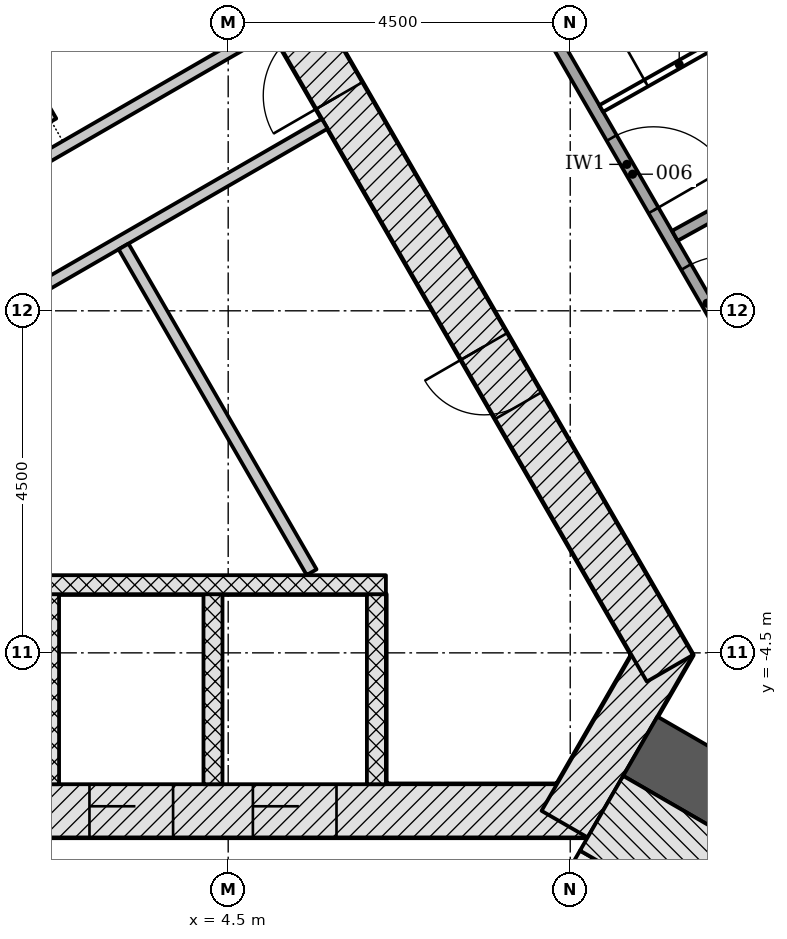
"""IFC4 building model, lengths in metres.
Left out: names, types, materials, properties, quantities, classifications, styles, units other than length and angle.
Written with IfcOpenShell. Run it as: python <this file> out.ifc"""

import sys

from ifc_helpers import new_model, si_unit, direction, frame, frame_2d, origin, place, context, subcontext, project, spatial, rectangle, extrude, element, fill, save


model = new_model("IFC4")
c1 = context("Model", 3, precision=1e-05, world=origin(), true_north=direction((0.0, 1.0)))
c2 = subcontext(c1, "Body", "Model", "MODEL_VIEW")
j1 = project(units=[si_unit("LENGTHUNIT", "METRE"), si_unit("PLANEANGLEUNIT", "RADIAN")], contexts=[c1])
p1 = place(None, origin())
s1 = spatial("IfcSite", under=j1, at=p1, CompositionType="ELEMENT")
p2 = place(p1, origin())
s2 = spatial("IfcBuilding", under=s1, at=p2, CompositionType="ELEMENT")
p3 = place(p2, frame((0.0, 0.0, 27.6)))
s3 = spatial("IfcBuildingStorey", under=s2, at=p3, CompositionType="ELEMENT", Elevation=27.6)
p4 = place(p3, frame((-9.229, -6.578, -0.2), z_axis=(0.0, 0.0, 1.0), x_axis=(1.0, 0.0, 0.0)))
e1 = element("IfcWall", 1, at=p4, inside=s3, PredefinedType="SHEAR", context=c2, shape_type="SweptSolid", body=[
    extrude(rectangle(XDim=18.458, YDim=0.7, at=frame_2d((9.229, 0.0))), origin(), (0.0, 0.0, 1.0), 3.6),
])
p5 = place(p4, frame((3.304, 0.0, 0.2)))
e2 = element("IfcOpeningElement", 2, at=p5, cuts=e1, PredefinedType="OPENING", context=c2, shape_type="SweptSolid", body=[
    extrude(rectangle(XDim=1.1, YDim=2.1, at=frame_2d((0.55, 1.05))), frame((0.0, 0.36, 0.0), z_axis=(0.0, -1.0, 0.0), x_axis=(1.0, 0.0, 0.0)), (0.0, 0.0, 1.0), 0.72),
])
p6 = place(p4, frame((5.454, 0.0, 0.2)))
e3 = element("IfcOpeningElement", 3, at=p6, cuts=e1, PredefinedType="OPENING", context=c2, shape_type="SweptSolid", body=[
    extrude(rectangle(XDim=1.1, YDim=2.1, at=frame_2d((0.55, 1.05))), frame((0.0, 0.36, 0.0), z_axis=(0.0, -1.0, 0.0), x_axis=(1.0, 0.0, 0.0)), (0.0, 0.0, 1.0), 0.72),
])
p7 = place(p4, frame((7.604, 0.0, 0.2)))
e4 = element("IfcOpeningElement", 4, at=p7, cuts=e1, PredefinedType="OPENING", context=c2, shape_type="SweptSolid", body=[
    extrude(rectangle(XDim=1.1, YDim=2.1, at=frame_2d((0.55, 1.05))), frame((0.0, 0.36, 0.0), z_axis=(0.0, -1.0, 0.0), x_axis=(1.0, 0.0, 0.0)), (0.0, 0.0, 1.0), 0.72),
])
p8 = place(p4, frame((9.754, 0.0, 0.2)))
e5 = element("IfcOpeningElement", 5, at=p8, cuts=e1, PredefinedType="OPENING", context=c2, shape_type="SweptSolid", body=[
    extrude(rectangle(XDim=1.1, YDim=2.1, at=frame_2d((0.55, 1.05))), frame((0.0, 0.36, 0.0), z_axis=(0.0, -1.0, 0.0), x_axis=(1.0, 0.0, 0.0)), (0.0, 0.0, 1.0), 0.72),
])
p9 = place(p4, frame((11.904, 0.0, 0.2)))
e6 = element("IfcOpeningElement", 6, at=p9, cuts=e1, PredefinedType="OPENING", context=c2, shape_type="SweptSolid", body=[
    extrude(rectangle(XDim=1.1, YDim=2.1, at=frame_2d((0.55, 1.05))), frame((0.0, 0.36, 0.0), z_axis=(0.0, -1.0, 0.0), x_axis=(1.0, 0.0, 0.0)), (0.0, 0.0, 1.0), 0.72),
])
p10 = place(p4, frame((14.054, 0.0, 0.2)))
e7 = element("IfcOpeningElement", 7, at=p10, cuts=e1, PredefinedType="OPENING", context=c2, shape_type="SweptSolid", body=[
    extrude(rectangle(XDim=1.1, YDim=2.1, at=frame_2d((0.55, 1.05))), frame((0.0, 0.36, 0.0), z_axis=(0.0, -1.0, 0.0), x_axis=(1.0, 0.0, 0.0)), (0.0, 0.0, 1.0), 0.72),
])
p11 = place(p4, frame((1.079, 0.0, 0.2)))
e8 = element("IfcOpeningElement", 8, at=p11, cuts=e1, PredefinedType="OPENING", context=c2, shape_type="SweptSolid", body=[
    extrude(rectangle(XDim=0.9, YDim=2.1, at=frame_2d((0.45, 1.05))), frame((0.0, 0.36, 0.0), z_axis=(0.0, -1.0, 0.0), x_axis=(1.0, 0.0, 0.0)), (0.0, 0.0, 1.0), 0.72),
])
p12 = place(p3, frame((8.926, -6.753, -0.2), z_axis=(0.0, 0.0, 1.0), x_axis=(0.500042739161, 0.866000726912, 0.0)))
e9 = element("IfcWall", 9, at=p12, inside=s3, PredefinedType="SHEAR", context=c2, shape_type="SweptSolid", body=[
    extrude(rectangle(XDim=2.771, YDim=0.7, at=frame_2d((1.386, 0.0))), origin(), (0.0, 0.0, 1.0), 3.6),
])
p13 = place(p3, frame((10.311, -4.703, -0.2), z_axis=(0.0, 0.0, 1.0), x_axis=(-0.500001446645, 0.866024568562, 0.0)))
e10 = element("IfcWall", 10, at=p13, inside=s3, PredefinedType="SHEAR", context=c2, shape_type="SweptSolid", body=[
    extrude(rectangle(XDim=18.458, YDim=0.7, at=frame_2d((9.229, 0.0))), origin(), (0.0, 0.0, 1.0), 3.6),
])
p14 = place(p13, frame((8.7, 0.0, 0.2)))
e11 = element("IfcOpeningElement", 11, at=p14, cuts=e10, PredefinedType="OPENING", context=c2, shape_type="SweptSolid", body=[
    extrude(rectangle(XDim=1.0, YDim=2.1, at=frame_2d((0.5, 1.05))), frame((0.0, 0.36, 0.0), z_axis=(0.0, -1.0, 0.0), x_axis=(1.0, 0.0, 0.0)), (0.0, 0.0, 1.0), 0.72),
])
p15 = place(p13, frame((3.99, 0.0, 0.2)))
e12 = element("IfcOpeningElement", 12, at=p15, cuts=e10, PredefinedType="OPENING", context=c2, shape_type="SweptSolid", body=[
    extrude(rectangle(XDim=0.9, YDim=2.1, at=frame_2d((0.45, 1.05))), frame((0.0, 0.36, 0.0), z_axis=(0.0, -1.0, 0.0), x_axis=(1.0, 0.0, 0.0)), (0.0, 0.0, 1.0), 0.72),
])
p16 = place(p13, frame((13.539, 0.0, 0.2)))
e13 = element("IfcOpeningElement", 13, at=p16, cuts=e10, PredefinedType="OPENING", context=c2, shape_type="SweptSolid", body=[
    extrude(rectangle(XDim=0.9, YDim=2.1, at=frame_2d((0.45, 1.05))), frame((0.0, 0.36, 0.0), z_axis=(0.0, -1.0, 0.0), x_axis=(1.0, 0.0, 0.0)), (0.0, 0.0, 1.0), 0.72),
])
p17 = place(p3, frame((9.922, -5.728, -0.2), z_axis=(0.0, 0.0, 1.0), x_axis=(0.866028046028, -0.499995423472, 0.0)))
e14 = element("IfcWall", 14, at=p17, inside=s3, PredefinedType="SHEAR", context=c2, shape_type="SweptSolid", body=[
    extrude(rectangle(XDim=14.633, YDim=0.9, at=frame_2d((7.316, 0.0))), origin(), (0.0, 0.0, 1.0), 3.6),
])
for number, where, z_axis, x_axis in (
    (15, (2.15, -6.228, -0.2), (0.0, 0.0, 1.0), (0.0, 1.0, 0.0)),
    (16, (4.3, -6.228, -0.2), (0.0, 0.0, 1.0), (0.0, 1.0, 0.0)),
    (17, (6.45, -6.228, -0.2), (0.0, 0.0, 1.0), (0.0, 1.0, 0.0)),
):
    element("IfcWall", number, at=place(p3, frame(where, z_axis=z_axis, x_axis=x_axis)), inside=s3, PredefinedType="PARTITIONING", context=c2, shape_type="SweptSolid", body=[
        extrude(rectangle(XDim=2.5, YDim=0.25, at=frame_2d((1.25, 0.0))), origin(), (0.0, 0.0, 1.0), 3.6),
    ])
p18 = place(p3, frame((-6.575, -3.603, 0.0), z_axis=(0.0, 0.0, 1.0), x_axis=(1.0, 0.0, 0.0)))
e18 = element("IfcWall", 18, at=p18, inside=s3, PredefinedType="PARTITIONING", context=c2, shape_type="SweptSolid", body=[
    extrude(rectangle(XDim=13.15, YDim=0.25, at=frame_2d((6.575, 0.0))), origin(), (0.0, 0.0, 1.0), 3.4),
])
p19 = place(p3, frame((-4.523, -1.807, 0.0), z_axis=(0.0, 0.0, 1.0), x_axis=(0.866030300338, 0.499991518824, 0.0)))
e19 = element("IfcWall", 19, at=p19, inside=s3, PredefinedType="PARTITIONING", context=c2, shape_type="SweptSolid", body=[
    extrude(rectangle(XDim=11.049, YDim=0.15, at=frame_2d((5.524, 0.0))), origin(), (0.0, 0.0, 1.0), 3.4),
])
p20 = place(p19, frame((3.525, 0.0, 0.0)))
e20 = element("IfcOpeningElement", 20, at=p20, cuts=e19, PredefinedType="OPENING", context=c2, shape_type="SweptSolid", body=[
    extrude(rectangle(XDim=0.9, YDim=2.1, at=frame_2d((0.45, 1.05))), frame((0.0, 0.085, 0.0), z_axis=(0.0, -1.0, 0.0), x_axis=(1.0, 0.0, 0.0)), (0.0, 0.0, 1.0), 0.17),
])
p21 = place(p3, frame((-4.404, -3.413, 0.0), z_axis=(0.0, 0.0, 1.0), x_axis=(0.866022252853, 0.500005457533, 0.0)))
e21 = element("IfcWall", 21, at=p21, inside=s3, PredefinedType="PARTITIONING", context=c2, shape_type="SweptSolid", body=[
    extrude(rectangle(XDim=11.749, YDim=0.15, at=frame_2d((5.875, 0.0))), origin(), (0.0, 0.0, 1.0), 3.4),
])
p22 = place(p21, frame((3.875, 0.0, 0.0)))
e22 = element("IfcOpeningElement", 22, at=p22, cuts=e21, PredefinedType="OPENING", context=c2, shape_type="SweptSolid", body=[
    extrude(rectangle(XDim=0.9, YDim=2.1, at=frame_2d((0.45, 1.05))), frame((0.0, 0.085, 0.0), z_axis=(0.0, -1.0, 0.0), x_axis=(1.0, 0.0, 0.0)), (0.0, 0.0, 1.0), 0.17),
])
p23 = place(p3, frame((2.174, 2.492, 0.0), z_axis=(0.0, 0.0, 1.0), x_axis=(-0.499999641798, 0.866025610592, 0.0)))
e23 = element("IfcWall", 23, at=p23, inside=s3, PredefinedType="PARTITIONING", context=c2, shape_type="SweptSolid", body=[
    extrude(rectangle(XDim=4.244, YDim=0.15, at=frame_2d((2.122, 0.0))), origin(), (0.0, 0.0, 1.0), 3.4),
])
p24 = place(p3, frame((5.598, -3.439, 0.0), z_axis=(0.0, 0.0, 1.0), x_axis=(-0.500007155043, 0.866021272779, 0.0)))
e24 = element("IfcWall", 24, at=p24, inside=s3, PredefinedType="PARTITIONING", context=c2, shape_type="SweptSolid", body=[
    extrude(rectangle(XDim=4.949, YDim=0.15, at=frame_2d((2.474, 0.0))), origin(), (0.0, 0.0, 1.0), 3.4),
])
p25 = place(p3, frame((7.44, -10.226, -0.2), z_axis=(0.0, 0.0, 1.0), x_axis=(0.500022077904, 0.866012656725, 0.0)))
e25 = element("IfcWall", 25, at=p25, inside=s3, PredefinedType="SHEAR", context=c2, shape_type="SweptSolid", body=[
    extrude(rectangle(XDim=3.55, YDim=0.2, at=frame_2d((1.775, 0.0))), origin(), (0.0, 0.0, 1.0), 3.6),
])
p26 = place(p25, frame((1.175, 0.0, 0.2)))
e26 = element("IfcOpeningElement", 26, at=p26, cuts=e25, PredefinedType="OPENING", context=c2, shape_type="SweptSolid", body=[
    extrude(rectangle(XDim=1.2, YDim=2.1, at=frame_2d((0.6, 1.05))), frame((0.0, 0.11, 0.0), z_axis=(0.0, -1.0, 0.0), x_axis=(1.0, 0.0, 0.0)), (0.0, 0.0, 1.0), 0.22),
])
p27 = place(p3, frame((9.413, -6.61, -0.2), z_axis=(0.0, 0.0, 1.0), x_axis=(0.866018442252, -0.500012057535, 0.0)))
e27 = element("IfcWall", 27, at=p27, inside=s3, PredefinedType="SHEAR", context=c2, shape_type="SweptSolid", body=[
    extrude(rectangle(XDim=7.2, YDim=1.136, at=frame_2d((3.6, 0.0))), origin(), (0.0, 0.0, 1.0), 3.6),
])
p28 = place(p3, frame((5.981, 8.446, 0.0), z_axis=(0.0, 0.0, 1.0), x_axis=(0.499996620721, -0.866027354803, 0.0)))
e28 = element("IfcWall", 28, at=p28, inside=s3, PredefinedType="PARTITIONING", context=c2, shape_type="SweptSolid", body=[
    extrude(rectangle(XDim=15.057, YDim=0.15, at=frame_2d((7.528, 0.0))), origin(), (0.0, 0.0, 1.0), 2.768),
])
p29 = place(p28, frame((9.087, 0.0, 0.0)))
e29 = element("IfcOpeningElement", 29, at=p29, cuts=e28, PredefinedType="OPENING", context=c2, shape_type="SweptSolid", body=[
    extrude(rectangle(XDim=1.1, YDim=2.1, at=frame_2d((0.55, 1.05))), frame((0.0, 0.085, 0.0), z_axis=(0.0, -1.0, 0.0), x_axis=(1.0, 0.0, 0.0)), (0.0, 0.0, 1.0), 0.17),
])
p30 = place(p28, frame((7.128, 0.0, 0.0)))
e30 = element("IfcOpeningElement", 30, at=p30, cuts=e28, PredefinedType="OPENING", context=c2, shape_type="SweptSolid", body=[
    extrude(rectangle(XDim=1.1, YDim=2.1, at=frame_2d((0.55, 1.05))), frame((0.0, 0.085, 0.0), z_axis=(0.0, -1.0, 0.0), x_axis=(1.0, 0.0, 0.0)), (0.0, 0.0, 1.0), 0.17),
])
p31 = place(p3, frame((17.521, 4.937, 0.0), z_axis=(0.0, 0.0, 1.0), x_axis=(-0.875148563779, -0.483854307944, 0.0)))
e31 = element("IfcWall", 31, at=p31, inside=s3, PredefinedType="PARTITIONING", context=c2, shape_type="SweptSolid", body=[
    extrude(rectangle(XDim=8.164, YDim=0.15, at=frame_2d((4.082, 0.0))), origin(), (0.0, 0.0, 1.0), 2.768),
])
p32 = place(p3, frame((9.408, 2.662, 0.0), z_axis=(0.0, 0.0, 1.0), x_axis=(0.870608725809, 0.491976062981, 0.0)))
e32 = element("IfcWall", 32, at=p32, inside=s3, PredefinedType="PARTITIONING", context=c2, shape_type="SweptSolid", body=[
    extrude(rectangle(XDim=2.378, YDim=0.1, at=frame_2d((1.189, 0.0))), origin(), (0.0, 0.0, 1.0), 3.4),
])
p33 = place(p32, frame((0.678, 0.0, 0.0)))
e33 = element("IfcOpeningElement", 33, at=p33, cuts=e32, PredefinedType="OPENING", context=c2, shape_type="SweptSolid", body=[
    extrude(rectangle(XDim=1.0, YDim=2.1, at=frame_2d((0.5, 1.05))), frame((0.0, 0.06, 0.0), z_axis=(0.0, -1.0, 0.0), x_axis=(1.0, 0.0, 0.0)), (0.0, 0.0, 1.0), 0.12),
])
p34 = place(p9, origin())
e34 = element("IfcDoor", 34, at=p34, inside=s3, OperationType="DOUBLE_DOOR_SLIDING", PredefinedType="DOOR", context=c2, shape_type="SweptSolid", body=[
    extrude(rectangle(XDim=1.1, YDim=2.1, at=frame_2d((0.55, 1.05))), frame((0.0, 0.025, 0.0), z_axis=(0.0, -1.0, 0.0), x_axis=(1.0, 0.0, 0.0)), (0.0, 0.0, 1.0), 0.05),
])
fill(e6, e34)
p35 = place(p10, origin())
e35 = element("IfcDoor", 35, at=p35, inside=s3, OperationType="DOUBLE_DOOR_SLIDING", PredefinedType="DOOR", context=c2, shape_type="SweptSolid", body=[
    extrude(rectangle(XDim=1.1, YDim=2.1, at=frame_2d((0.55, 1.05))), frame((0.0, 0.025, 0.0), z_axis=(0.0, -1.0, 0.0), x_axis=(1.0, 0.0, 0.0)), (0.0, 0.0, 1.0), 0.05),
])
fill(e7, e35)
p36 = place(p14, origin())
e36 = element("IfcDoor", 36, at=p36, inside=s3, OperationType="SINGLE_SWING_LEFT", PredefinedType="DOOR", context=c2, shape_type="SweptSolid", body=[
    extrude(rectangle(XDim=1.0, YDim=2.1, at=frame_2d((0.5, 1.05))), frame((0.0, 0.075, 0.0), z_axis=(0.0, -1.0, 0.0), x_axis=(1.0, 0.0, 0.0)), (0.0, 0.0, 1.0), 0.15),
])
fill(e11, e36)
p37 = place(p15, origin())
e37 = element("IfcDoor", 37, at=p37, inside=s3, OperationType="SINGLE_SWING_RIGHT", PredefinedType="DOOR", context=c2, shape_type="SweptSolid", body=[
    extrude(rectangle(XDim=0.9, YDim=2.1, at=frame_2d((0.45, 1.05))), frame((0.0, 0.075, 0.0), z_axis=(0.0, -1.0, 0.0), x_axis=(1.0, 0.0, 0.0)), (0.0, 0.0, 1.0), 0.15),
])
fill(e12, e37)
p38 = place(p29, origin())
e38 = element("IfcDoor", 38, at=p38, inside=s3, OperationType="SINGLE_SWING_RIGHT", PredefinedType="DOOR", context=c2, shape_type="SweptSolid", body=[
    extrude(rectangle(XDim=1.1, YDim=2.1, at=frame_2d((0.55, 1.05))), frame((0.0, 0.025, 0.0), z_axis=(0.0, -1.0, 0.0), x_axis=(1.0, 0.0, 0.0)), (0.0, 0.0, 1.0), 0.05),
])
fill(e29, e38)
p39 = place(p30, origin())
e39 = element("IfcDoor", 39, at=p39, inside=s3, OperationType="SINGLE_SWING_RIGHT", PredefinedType="DOOR", context=c2, shape_type="SweptSolid", body=[
    extrude(rectangle(XDim=1.1, YDim=2.1, at=frame_2d((0.55, 1.05))), frame((0.0, 0.025, 0.0), z_axis=(0.0, -1.0, 0.0), x_axis=(1.0, 0.0, 0.0)), (0.0, 0.0, 1.0), 0.05),
])
fill(e30, e39)
p40 = place(p33, origin())
e40 = element("IfcDoor", 40, at=p40, inside=s3, OperationType="SINGLE_SWING_LEFT", PredefinedType="DOOR", context=c2, shape_type="SweptSolid", body=[
    extrude(rectangle(XDim=1.0, YDim=2.1, at=frame_2d((0.5, 1.05))), frame((0.0, 0.025, 0.0), z_axis=(0.0, -1.0, 0.0), x_axis=(1.0, 0.0, 0.0)), (0.0, 0.0, 1.0), 0.05),
])
fill(e33, e40)
save(model, sys.argv[1])
